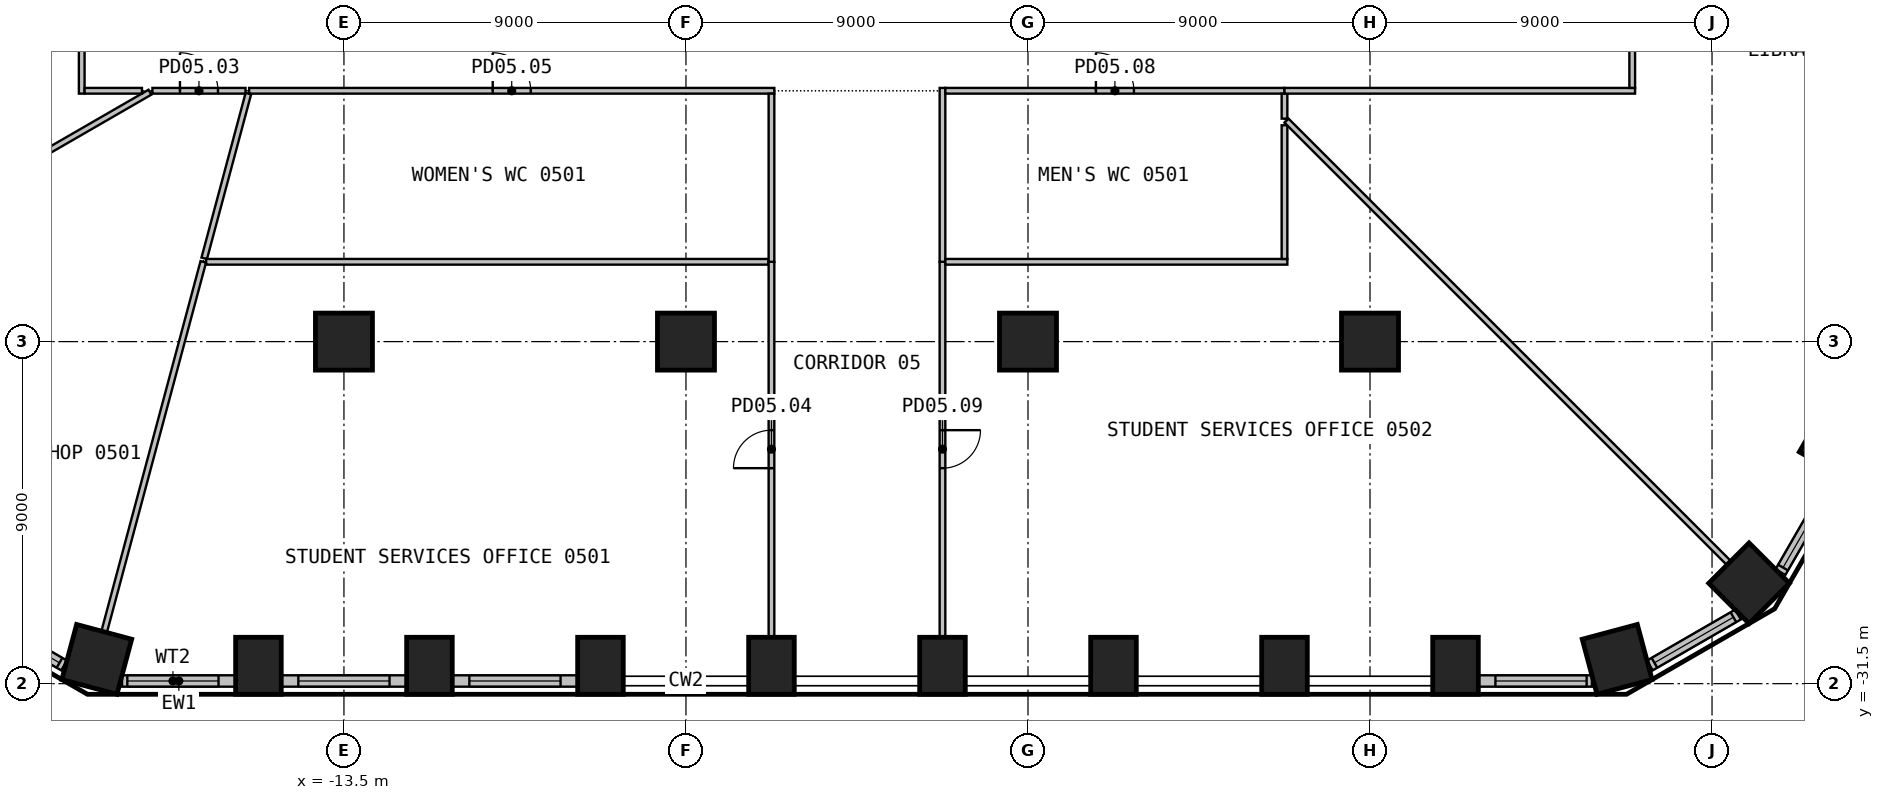
"""IFC4 building model, lengths in metres.
Left out: names, types, materials, properties, quantities, classifications, styles, units other than length and angle.
Written with IfcOpenShell. Run it as: python <this file> out.ifc"""

import sys

from ifc_helpers import new_model, si_unit, direction, frame, frame_2d, origin, origin_2d, place, context, subcontext, project, spatial, rectangle, circle, extrude, element, fill, save


model = new_model("IFC4")
c1 = context("Model", 3, precision=1e-05, world=origin(), true_north=direction((0.0, 1.0)))
c2 = subcontext(c1, "Body", "Model", "MODEL_VIEW")
j1 = project(units=[si_unit("LENGTHUNIT", "METRE"), si_unit("PLANEANGLEUNIT", "RADIAN")], contexts=[c1])
p1 = place(None, origin())
s1 = spatial("IfcSite", under=j1, at=p1, CompositionType="ELEMENT")
p2 = place(p1, origin())
s2 = spatial("IfcBuilding", under=s1, at=p2, CompositionType="ELEMENT")
p3 = place(p2, frame((0.0, 0.0, 25.2)))
s3 = spatial("IfcBuildingStorey", under=s2, at=p3, CompositionType="ELEMENT", Elevation=25.2)
p4 = place(p3, frame((-20.004, -30.861, 0.0), z_axis=(0.0, 0.0, 1.0), x_axis=(0.965925826289, -0.258819045103, 0.0)))
e1 = element("IfcColumn", 1, at=p4, inside=s3, PredefinedType="COLUMN", context=c2, shape_type="SweptSolid", body=[
    extrude(rectangle(XDim=1.5, YDim=1.5, at=origin_2d()), origin(), (0.0, 0.0, 1.0), 4.425),
])
for number, where, z_axis, x_axis in (
    (2, (-15.75, -31.03, 0.0), (0.0, 0.0, 1.0), (1.0, 0.0, 0.0)),
    (3, (-11.25, -31.03, 0.0), (0.0, 0.0, 1.0), (1.0, 0.0, 0.0)),
    (4, (-6.75, -31.03, 0.0), (0.0, 0.0, 1.0), (1.0, 0.0, 0.0)),
    (5, (-2.25, -31.03, 0.0), (0.0, 0.0, 1.0), (1.0, 0.0, 0.0)),
    (6, (2.25, -31.03, 0.0), (0.0, 0.0, 1.0), (1.0, 0.0, 0.0)),
    (7, (6.75, -31.03, 0.0), (0.0, 0.0, 1.0), (1.0, 0.0, 0.0)),
    (8, (11.25, -31.03, 0.0), (0.0, 0.0, 1.0), (1.0, 0.0, 0.0)),
    (9, (15.75, -31.03, 0.0), (0.0, 0.0, 1.0), (1.0, 0.0, 0.0)),
):
    element("IfcColumn", number, at=place(p3, frame(where, z_axis=z_axis, x_axis=x_axis)), inside=s3, PredefinedType="COLUMN", context=c2, shape_type="SweptSolid", body=[
        extrude(rectangle(XDim=1.2, YDim=1.5, at=origin_2d()), origin(), (0.0, 0.0, 1.0), 4.425),
    ])
for number, where, z_axis, x_axis in (
    (10, (20.004, -30.861, 0.0), (0.0, 0.0, 1.0), (0.966, 0.259, 0.0)),
    (11, (23.475, -28.857, 0.0), (0.0, 0.0, 1.0), (0.707, 0.707, 0.0)),
):
    element("IfcColumn", number, at=place(p3, frame(where, z_axis=z_axis, x_axis=x_axis)), inside=s3, PredefinedType="COLUMN", context=c2, shape_type="SweptSolid", body=[
        extrude(rectangle(XDim=1.5, YDim=1.5, at=origin_2d()), origin(), (0.0, 0.0, 1.0), 4.425),
    ])
p5 = place(p3, frame((25.748, -25.258, 0.0), z_axis=(0.0, 0.0, 1.0), x_axis=(0.5, 0.866025403784, 0.0)))
e12 = element("IfcColumn", 12, at=p5, inside=s3, PredefinedType="COLUMN", context=c2, shape_type="SweptSolid", body=[
    extrude(rectangle(XDim=1.2, YDim=1.5, at=origin_2d()), origin(), (0.0, 0.0, 1.0), 4.425),
])
for number, where, z_axis, x_axis in (
    (13, (-13.5, -22.5, 0.0), (0.0, 0.0, 1.0), (1.0, 0.0, 0.0)),
    (14, (-4.5, -22.5, 0.0), (0.0, 0.0, 1.0), (1.0, 0.0, 0.0)),
    (15, (4.5, -22.5, 0.0), (0.0, 0.0, 1.0), (1.0, 0.0, 0.0)),
    (16, (13.5, -22.5, 0.0), (0.0, 0.0, 1.0), (1.0, 0.0, 0.0)),
):
    element("IfcColumn", number, at=place(p3, frame(where, z_axis=z_axis, x_axis=x_axis)), inside=s3, PredefinedType="COLUMN", context=c2, shape_type="SweptSolid", body=[
        extrude(circle(Radius=0.75, at=origin_2d()), origin(), (0.0, 0.0, 1.0), 4.425),
    ])
p6 = place(p3, frame((-19.339, -31.43, 0.0), z_axis=(0.0, 0.0, 1.0), x_axis=(1.0, 0.0, 0.0)))
e17 = element("IfcWall", 17, at=p6, inside=s3, PredefinedType="SOLIDWALL", context=c2, shape_type="SweptSolid", body=[
    extrude(rectangle(XDim=2.989, YDim=0.3, at=frame_2d((1.494, 0.0))), origin(), (0.0, 0.0, 1.0), 4.425),
])
p7 = place(p6, frame((0.139, 0.0, 0.9)))
e18 = element("IfcOpeningElement", 18, at=p7, cuts=e17, PredefinedType="OPENING", context=c2, shape_type="SweptSolid", body=[
    extrude(rectangle(XDim=2.4, YDim=3.0, at=frame_2d((1.2, 1.5))), frame((0.0, 0.16, 0.0), z_axis=(0.0, -1.0, 0.0), x_axis=(1.0, 0.0, 0.0)), (0.0, 0.0, 1.0), 0.32),
])
p8 = place(p3, frame((-15.149, -31.43, 0.0), z_axis=(0.0, 0.0, 1.0), x_axis=(1.0, 0.0, 0.0)))
e19 = element("IfcWall", 19, at=p8, inside=s3, PredefinedType="SOLIDWALL", context=c2, shape_type="SweptSolid", body=[
    extrude(rectangle(XDim=3.299, YDim=0.3, at=frame_2d((1.649, 0.0))), origin(), (0.0, 0.0, 1.0), 4.425),
])
p9 = place(p8, frame((0.449, 0.0, 0.9)))
e20 = element("IfcOpeningElement", 20, at=p9, cuts=e19, PredefinedType="OPENING", context=c2, shape_type="SweptSolid", body=[
    extrude(rectangle(XDim=2.4, YDim=3.0, at=frame_2d((1.2, 1.5))), frame((0.0, 0.16, 0.0), z_axis=(0.0, -1.0, 0.0), x_axis=(1.0, 0.0, 0.0)), (0.0, 0.0, 1.0), 0.32),
])
p10 = place(p3, frame((-10.649, -31.43, 0.0), z_axis=(0.0, 0.0, 1.0), x_axis=(1.0, 0.0, 0.0)))
e21 = element("IfcWall", 21, at=p10, inside=s3, PredefinedType="SOLIDWALL", context=c2, shape_type="SweptSolid", body=[
    extrude(rectangle(XDim=3.299, YDim=0.3, at=frame_2d((1.649, 0.0))), origin(), (0.0, 0.0, 1.0), 4.425),
])
p11 = place(p10, frame((0.449, 0.0, 0.9)))
e22 = element("IfcOpeningElement", 22, at=p11, cuts=e21, PredefinedType="OPENING", context=c2, shape_type="SweptSolid", body=[
    extrude(rectangle(XDim=2.4, YDim=3.0, at=frame_2d((1.2, 1.5))), frame((0.0, 0.16, 0.0), z_axis=(0.0, -1.0, 0.0), x_axis=(1.0, 0.0, 0.0)), (0.0, 0.0, 1.0), 0.32),
])
p12 = place(p3, frame((16.351, -31.43, 0.0), z_axis=(0.0, 0.0, 1.0), x_axis=(1.0, 0.0, 0.0)))
e23 = element("IfcWall", 23, at=p12, inside=s3, PredefinedType="SOLIDWALL", context=c2, shape_type="SweptSolid", body=[
    extrude(rectangle(XDim=2.989, YDim=0.3, at=frame_2d((1.494, 0.0))), origin(), (0.0, 0.0, 1.0), 4.425),
])
p13 = place(p12, frame((0.449, 0.0, 0.9)))
e24 = element("IfcOpeningElement", 24, at=p13, cuts=e23, PredefinedType="OPENING", context=c2, shape_type="SweptSolid", body=[
    extrude(rectangle(XDim=2.4, YDim=3.0, at=frame_2d((1.2, 1.5))), frame((0.0, 0.16, 0.0), z_axis=(0.0, -1.0, 0.0), x_axis=(1.0, 0.0, 0.0)), (0.0, 0.0, 1.0), 0.32),
])
p14 = place(p3, frame((20.864, -31.021, 0.0), z_axis=(0.0, 0.0, 1.0), x_axis=(0.866001915448, 0.500040680786, 0.0)))
e25 = element("IfcWall", 25, at=p14, inside=s3, PredefinedType="SOLIDWALL", context=c2, shape_type="SweptSolid", body=[
    extrude(rectangle(XDim=2.678, YDim=0.3, at=frame_2d((1.339, 0.0))), origin(), (0.0, 0.0, 1.0), 4.425),
])
p15 = place(p14, frame((0.139, 0.0, 0.9)))
e26 = element("IfcOpeningElement", 26, at=p15, cuts=e25, PredefinedType="OPENING", context=c2, shape_type="SweptSolid", body=[
    extrude(rectangle(XDim=2.4, YDim=3.0, at=frame_2d((1.2, 1.5))), frame((0.0, 0.16, 0.0), z_axis=(0.0, -1.0, 0.0), x_axis=(1.0, 0.0, 0.0)), (0.0, 0.0, 1.0), 0.32),
])
p16 = place(p3, frame((24.299, -28.566, 0.0), z_axis=(0.0, 0.0, 1.0), x_axis=(0.49999586137, 0.866027793211, 0.0)))
e27 = element("IfcWall", 27, at=p16, inside=s3, PredefinedType="SOLIDWALL", context=c2, shape_type="SweptSolid", body=[
    extrude(rectangle(XDim=2.989, YDim=0.3, at=frame_2d((1.494, 0.0))), origin(), (0.0, 0.0, 1.0), 4.425),
])
p17 = place(p16, frame((0.139, 0.0, 0.9)))
e28 = element("IfcOpeningElement", 28, at=p17, cuts=e27, PredefinedType="OPENING", context=c2, shape_type="SweptSolid", body=[
    extrude(rectangle(XDim=2.4, YDim=3.0, at=frame_2d((1.2, 1.5))), frame((0.0, 0.16, 0.0), z_axis=(0.0, -1.0, 0.0), x_axis=(1.0, 0.0, 0.0)), (0.0, 0.0, 1.0), 0.32),
])
p18 = place(p3, frame((-23.183, -29.682, 0.0), z_axis=(0.0, 0.0, 1.0), x_axis=(0.866001915448, -0.500040680786, 0.0)))
e29 = element("IfcWall", 29, at=p18, inside=s3, PredefinedType="SOLIDWALL", context=c2, shape_type="SweptSolid", body=[
    extrude(rectangle(XDim=2.678, YDim=0.3, at=frame_2d((1.339, 0.0))), origin(), (0.0, 0.0, 1.0), 4.425),
])
p19 = place(p18, frame((0.139, 0.0, 0.9)))
e30 = element("IfcOpeningElement", 30, at=p19, cuts=e29, PredefinedType="OPENING", context=c2, shape_type="SweptSolid", body=[
    extrude(rectangle(XDim=2.4, YDim=3.0, at=frame_2d((1.2, 1.5))), frame((0.0, 0.16, 0.0), z_axis=(0.0, -1.0, 0.0), x_axis=(1.0, 0.0, 0.0)), (0.0, 0.0, 1.0), 0.32),
])
p20 = place(p3, frame((-18.605, -15.938, 0.0), z_axis=(0.0, 0.0, 1.0), x_axis=(-0.865988664976, -0.500063628085, 0.0)))
e31 = element("IfcWall", 31, at=p20, inside=s3, PredefinedType="PARTITIONING", context=c2, shape_type="SweptSolid", body=[
    extrude(rectangle(XDim=10.076, YDim=0.15, at=frame_2d((5.038, 0.0))), origin(), (0.0, 0.0, 1.0), 4.425),
])
p21 = place(p3, frame((-20.4, 2.974, 0.0), z_axis=(0.0, 0.0, 1.0), x_axis=(0.0, -1.0, 0.0)))
e32 = element("IfcWall", 32, at=p21, inside=s3, PredefinedType="PARTITIONING", context=c2, shape_type="SweptSolid", body=[
    extrude(rectangle(XDim=18.949, YDim=0.15, at=frame_2d((9.475, 0.0))), origin(), (0.0, 0.0, 1.0), 4.425),
])
p22 = place(p21, frame((8.975, 0.0, 0.0)))
e33 = element("IfcOpeningElement", 33, at=p22, cuts=e32, PredefinedType="OPENING", context=c2, shape_type="SweptSolid", body=[
    extrude(rectangle(XDim=1.0, YDim=2.1, at=frame_2d((0.5, 1.05))), frame((0.0, 0.085, 0.0), z_axis=(0.0, -1.0, 0.0), x_axis=(1.0, 0.0, 0.0)), (0.0, 0.0, 1.0), 0.17),
])
p23 = place(p3, frame((-20.325, -15.9, 0.0), z_axis=(0.0, 0.0, 1.0), x_axis=(1.0, 0.0, 0.0)))
e34 = element("IfcWall", 34, at=p23, inside=s3, PredefinedType="PARTITIONING", context=c2, shape_type="SweptSolid", body=[
    extrude(rectangle(XDim=1.51, YDim=0.15, at=frame_2d((0.755, 0.0))), origin(), (0.0, 0.0, 1.0), 4.425),
])
p24 = place(p3, frame((-17.201, -20.4, 0.0), z_axis=(0.0, 0.0, 1.0), x_axis=(-0.258837572796, -0.965920861618, 0.0)))
e35 = element("IfcWall", 35, at=p24, inside=s3, PredefinedType="PARTITIONING", context=c2, shape_type="SweptSolid", body=[
    extrude(rectangle(XDim=10.06, YDim=0.15, at=frame_2d((5.03, 0.0))), origin(), (0.0, 0.0, 1.0), 4.425),
])
p25 = place(p3, frame((-18.54, -15.9, 0.0), z_axis=(0.0, 0.0, 1.0), x_axis=(1.0, 0.0, 0.0)))
e36 = element("IfcWall", 36, at=p25, inside=s3, PredefinedType="PARTITIONING", context=c2, shape_type="SweptSolid", body=[
    extrude(rectangle(XDim=2.45, YDim=0.15, at=frame_2d((1.225, 0.0))), origin(), (0.0, 0.0, 1.0), 4.425),
])
p26 = place(p25, frame((0.725, 0.0, 0.0)))
e37 = element("IfcOpeningElement", 37, at=p26, cuts=e36, PredefinedType="OPENING", context=c2, shape_type="SweptSolid", body=[
    extrude(rectangle(XDim=1.0, YDim=2.1, at=frame_2d((0.5, 1.05))), frame((0.0, 0.085, 0.0), z_axis=(0.0, -1.0, 0.0), x_axis=(1.0, 0.0, 0.0)), (0.0, 0.0, 1.0), 0.17),
])
p27 = place(p3, frame((-16.014, -15.972, 0.0), z_axis=(0.0, 0.0, 1.0), x_axis=(-0.258894670978, -0.965905559224, 0.0)))
e38 = element("IfcWall", 38, at=p27, inside=s3, PredefinedType="PARTITIONING", context=c2, shape_type="SweptSolid", body=[
    extrude(rectangle(XDim=4.489, YDim=0.15, at=frame_2d((2.244, 0.0))), origin(), (0.0, 0.0, 1.0), 4.425),
])
p28 = place(p3, frame((-17.126, -20.4, 0.0), z_axis=(0.0, 0.0, 1.0), x_axis=(1.0, 0.0, 0.0)))
e39 = element("IfcWall", 39, at=p28, inside=s3, PredefinedType="PARTITIONING", context=c2, shape_type="SweptSolid", body=[
    extrude(rectangle(XDim=14.801, YDim=0.15, at=frame_2d((7.4, 0.0))), origin(), (0.0, 0.0, 1.0), 4.425),
])
p29 = place(p3, frame((-15.995, -15.9, 0.0), z_axis=(0.0, 0.0, 1.0), x_axis=(1.0, 0.0, 0.0)))
e40 = element("IfcWall", 40, at=p29, inside=s3, PredefinedType="PARTITIONING", context=c2, shape_type="SweptSolid", body=[
    extrude(rectangle(XDim=13.82, YDim=0.15, at=frame_2d((6.91, 0.0))), origin(), (0.0, 0.0, 1.0), 4.425),
])
p30 = place(p29, frame((6.41, 0.0, 0.0)))
e41 = element("IfcOpeningElement", 41, at=p30, cuts=e40, PredefinedType="OPENING", context=c2, shape_type="SweptSolid", body=[
    extrude(rectangle(XDim=1.0, YDim=2.1, at=frame_2d((0.5, 1.05))), frame((0.0, 0.085, 0.0), z_axis=(0.0, -1.0, 0.0), x_axis=(1.0, 0.0, 0.0)), (0.0, 0.0, 1.0), 0.17),
])
p31 = place(p3, frame((-2.25, -30.26, 0.0), z_axis=(0.0, 0.0, 1.0), x_axis=(0.0, 1.0, 0.0)))
e42 = element("IfcWall", 42, at=p31, inside=s3, PredefinedType="PARTITIONING", context=c2, shape_type="SweptSolid", body=[
    extrude(rectangle(XDim=9.86, YDim=0.15, at=frame_2d((4.93, 0.0))), origin(), (0.0, 0.0, 1.0), 4.425),
])
p32 = place(p31, frame((4.43, 0.0, 0.0)))
e43 = element("IfcOpeningElement", 43, at=p32, cuts=e42, PredefinedType="OPENING", context=c2, shape_type="SweptSolid", body=[
    extrude(rectangle(XDim=1.0, YDim=2.1, at=frame_2d((0.5, 1.05))), frame((0.0, 0.085, 0.0), z_axis=(0.0, -1.0, 0.0), x_axis=(1.0, 0.0, 0.0)), (0.0, 0.0, 1.0), 0.17),
])
p33 = place(p3, frame((-2.25, -20.4, 0.0), z_axis=(0.0, 0.0, 1.0), x_axis=(0.0, 1.0, 0.0)))
e44 = element("IfcWall", 44, at=p33, inside=s3, PredefinedType="PARTITIONING", context=c2, shape_type="SweptSolid", body=[
    extrude(rectangle(XDim=4.425, YDim=0.15, at=frame_2d((2.212, 0.0))), origin(), (0.0, 0.0, 1.0), 4.425),
])
p34 = place(p3, frame((2.25, -20.4, 0.0), z_axis=(0.0, 0.0, 1.0), x_axis=(0.0, -1.0, 0.0)))
e45 = element("IfcWall", 45, at=p34, inside=s3, PredefinedType="PARTITIONING", context=c2, shape_type="SweptSolid", body=[
    extrude(rectangle(XDim=9.86, YDim=0.15, at=frame_2d((4.93, 0.0))), origin(), (0.0, 0.0, 1.0), 4.425),
])
p35 = place(p34, frame((4.43, 0.0, 0.0)))
e46 = element("IfcOpeningElement", 46, at=p35, cuts=e45, PredefinedType="OPENING", context=c2, shape_type="SweptSolid", body=[
    extrude(rectangle(XDim=1.0, YDim=2.1, at=frame_2d((0.5, 1.05))), frame((0.0, 0.085, 0.0), z_axis=(0.0, -1.0, 0.0), x_axis=(1.0, 0.0, 0.0)), (0.0, 0.0, 1.0), 0.17),
])
p36 = place(p3, frame((2.25, -15.825, 0.0), z_axis=(0.0, 0.0, 1.0), x_axis=(0.0, -1.0, 0.0)))
e47 = element("IfcWall", 47, at=p36, inside=s3, PredefinedType="PARTITIONING", context=c2, shape_type="SweptSolid", body=[
    extrude(rectangle(XDim=4.575, YDim=0.15, at=frame_2d((2.288, 0.0))), origin(), (0.0, 0.0, 1.0), 4.425),
])
p37 = place(p3, frame((11.325, -20.4, 0.0), z_axis=(0.0, 0.0, 1.0), x_axis=(-1.0, 0.0, 0.0)))
e48 = element("IfcWall", 48, at=p37, inside=s3, PredefinedType="PARTITIONING", context=c2, shape_type="SweptSolid", body=[
    extrude(rectangle(XDim=9.0, YDim=0.15, at=frame_2d((4.5, 0.0))), origin(), (0.0, 0.0, 1.0), 4.425),
])
p38 = place(p3, frame((2.325, -15.9, 0.0), z_axis=(0.0, 0.0, 1.0), x_axis=(1.0, 0.0, 0.0)))
e49 = element("IfcWall", 49, at=p38, inside=s3, PredefinedType="PARTITIONING", context=c2, shape_type="SweptSolid", body=[
    extrude(rectangle(XDim=8.925, YDim=0.15, at=frame_2d((4.462, 0.0))), origin(), (0.0, 0.0, 1.0), 4.425),
])
p39 = place(p38, frame((3.962, 0.0, 0.0)))
e50 = element("IfcOpeningElement", 50, at=p39, cuts=e49, PredefinedType="OPENING", context=c2, shape_type="SweptSolid", body=[
    extrude(rectangle(XDim=1.0, YDim=2.1, at=frame_2d((0.5, 1.05))), frame((0.0, 0.085, 0.0), z_axis=(0.0, -1.0, 0.0), x_axis=(1.0, 0.0, 0.0)), (0.0, 0.0, 1.0), 0.17),
])
p40 = place(p3, frame((11.25, -16.808, 0.0), z_axis=(0.0, 0.0, 1.0), x_axis=(0.0, -1.0, 0.0)))
e51 = element("IfcWall", 51, at=p40, inside=s3, PredefinedType="PARTITIONING", context=c2, shape_type="SweptSolid", body=[
    extrude(rectangle(XDim=3.517, YDim=0.15, at=frame_2d((1.758, 0.0))), origin(), (0.0, 0.0, 1.0), 4.425),
])
p41 = place(p3, frame((11.25, -15.975, 0.0), z_axis=(0.0, 0.0, 1.0), x_axis=(0.0, -1.0, 0.0)))
e52 = element("IfcWall", 52, at=p41, inside=s3, PredefinedType="PARTITIONING", context=c2, shape_type="SweptSolid", body=[
    extrude(rectangle(XDim=0.658, YDim=0.15, at=frame_2d((0.329, 0.0))), origin(), (0.0, 0.0, 1.0), 4.425),
])
p42 = place(p3, frame((11.303, -16.686, 0.0), z_axis=(0.0, 0.0, 1.0), x_axis=(0.707114204919, -0.707099357376, 0.0)))
e53 = element("IfcWall", 53, at=p42, inside=s3, PredefinedType="PARTITIONING", context=c2, shape_type="SweptSolid", body=[
    extrude(rectangle(XDim=16.443, YDim=0.15, at=frame_2d((8.222, 0.0))), origin(), (0.0, 0.0, 1.0), 4.425),
])
p43 = place(p3, frame((11.25, -15.9, 0.0), z_axis=(0.0, 0.0, 1.0), x_axis=(1.0, 0.0, 0.0)))
e54 = element("IfcWall", 54, at=p43, inside=s3, PredefinedType="PARTITIONING", context=c2, shape_type="SweptSolid", body=[
    extrude(rectangle(XDim=9.225, YDim=0.15, at=frame_2d((4.613, 0.0))), origin(), (0.0, 0.0, 1.0), 4.425),
])
p44 = place(p3, frame((20.4, -15.825, 0.0), z_axis=(0.0, 0.0, 1.0), x_axis=(0.0, 1.0, 0.0)))
e55 = element("IfcWall", 55, at=p44, inside=s3, PredefinedType="PARTITIONING", context=c2, shape_type="SweptSolid", body=[
    extrude(rectangle(XDim=13.65, YDim=0.15, at=frame_2d((6.825, 0.0))), origin(), (0.0, 0.0, 1.0), 4.425),
])
p45 = place(p7, origin())
e56 = element("IfcWindow", 56, at=p45, inside=s3, PartitioningType="SINGLE_PANEL", PredefinedType="WINDOW", context=c2, shape_type="SweptSolid", body=[
    extrude(rectangle(XDim=2.4, YDim=3.0, at=frame_2d((1.2, 1.5))), frame((0.0, 0.03, 0.0), z_axis=(0.0, -1.0, 0.0), x_axis=(1.0, 0.0, 0.0)), (0.0, 0.0, 1.0), 0.06),
])
fill(e18, e56)
p46 = place(p9, origin())
e57 = element("IfcWindow", 57, at=p46, inside=s3, PartitioningType="SINGLE_PANEL", PredefinedType="WINDOW", context=c2, shape_type="SweptSolid", body=[
    extrude(rectangle(XDim=2.4, YDim=3.0, at=frame_2d((1.2, 1.5))), frame((0.0, 0.03, 0.0), z_axis=(0.0, -1.0, 0.0), x_axis=(1.0, 0.0, 0.0)), (0.0, 0.0, 1.0), 0.06),
])
fill(e20, e57)
p47 = place(p11, origin())
e58 = element("IfcWindow", 58, at=p47, inside=s3, PartitioningType="SINGLE_PANEL", PredefinedType="WINDOW", context=c2, shape_type="SweptSolid", body=[
    extrude(rectangle(XDim=2.4, YDim=3.0, at=frame_2d((1.2, 1.5))), frame((0.0, 0.03, 0.0), z_axis=(0.0, -1.0, 0.0), x_axis=(1.0, 0.0, 0.0)), (0.0, 0.0, 1.0), 0.06),
])
fill(e22, e58)
p48 = place(p13, origin())
e59 = element("IfcWindow", 59, at=p48, inside=s3, PartitioningType="SINGLE_PANEL", PredefinedType="WINDOW", context=c2, shape_type="SweptSolid", body=[
    extrude(rectangle(XDim=2.4, YDim=3.0, at=frame_2d((1.2, 1.5))), frame((0.0, 0.03, 0.0), z_axis=(0.0, -1.0, 0.0), x_axis=(1.0, 0.0, 0.0)), (0.0, 0.0, 1.0), 0.06),
])
fill(e24, e59)
p49 = place(p15, origin())
e60 = element("IfcWindow", 60, at=p49, inside=s3, PartitioningType="SINGLE_PANEL", PredefinedType="WINDOW", context=c2, shape_type="SweptSolid", body=[
    extrude(rectangle(XDim=2.4, YDim=3.0, at=frame_2d((1.2, 1.5))), frame((0.0, 0.03, 0.0), z_axis=(0.0, -1.0, 0.0), x_axis=(1.0, 0.0, 0.0)), (0.0, 0.0, 1.0), 0.06),
])
fill(e26, e60)
p50 = place(p17, origin())
e61 = element("IfcWindow", 61, at=p50, inside=s3, PartitioningType="SINGLE_PANEL", PredefinedType="WINDOW", context=c2, shape_type="SweptSolid", body=[
    extrude(rectangle(XDim=2.4, YDim=3.0, at=frame_2d((1.2, 1.5))), frame((0.0, 0.03, 0.0), z_axis=(0.0, -1.0, 0.0), x_axis=(1.0, 0.0, 0.0)), (0.0, 0.0, 1.0), 0.06),
])
fill(e28, e61)
p51 = place(p19, origin())
e62 = element("IfcWindow", 62, at=p51, inside=s3, PartitioningType="SINGLE_PANEL", PredefinedType="WINDOW", context=c2, shape_type="SweptSolid", body=[
    extrude(rectangle(XDim=2.4, YDim=3.0, at=frame_2d((1.2, 1.5))), frame((0.0, 0.03, 0.0), z_axis=(0.0, -1.0, 0.0), x_axis=(1.0, 0.0, 0.0)), (0.0, 0.0, 1.0), 0.06),
])
fill(e30, e62)
p52 = place(p26, origin())
e63 = element("IfcDoor", 63, at=p52, inside=s3, OperationType="SINGLE_SWING_LEFT", PredefinedType="DOOR", context=c2, shape_type="SweptSolid", body=[
    extrude(rectangle(XDim=1.0, YDim=2.1, at=frame_2d((0.5, 1.05))), frame((0.0, 0.025, 0.0), z_axis=(0.0, -1.0, 0.0), x_axis=(1.0, 0.0, 0.0)), (0.0, 0.0, 1.0), 0.05),
])
fill(e37, e63)
p53 = place(p32, origin())
e64 = element("IfcDoor", 64, at=p53, inside=s3, OperationType="SINGLE_SWING_RIGHT", PredefinedType="DOOR", context=c2, shape_type="SweptSolid", body=[
    extrude(rectangle(XDim=1.0, YDim=2.1, at=frame_2d((0.5, 1.05))), frame((0.0, 0.025, 0.0), z_axis=(0.0, -1.0, 0.0), x_axis=(1.0, 0.0, 0.0)), (0.0, 0.0, 1.0), 0.05),
])
fill(e43, e64)
p54 = place(p30, origin())
e65 = element("IfcDoor", 65, at=p54, inside=s3, OperationType="SINGLE_SWING_RIGHT", PredefinedType="DOOR", context=c2, shape_type="SweptSolid", body=[
    extrude(rectangle(XDim=1.0, YDim=2.1, at=frame_2d((0.5, 1.05))), frame((0.0, 0.025, 0.0), z_axis=(0.0, -1.0, 0.0), x_axis=(1.0, 0.0, 0.0)), (0.0, 0.0, 1.0), 0.05),
])
fill(e41, e65)
p55 = place(p39, origin())
e66 = element("IfcDoor", 66, at=p55, inside=s3, OperationType="SINGLE_SWING_LEFT", PredefinedType="DOOR", context=c2, shape_type="SweptSolid", body=[
    extrude(rectangle(XDim=1.0, YDim=2.1, at=frame_2d((0.5, 1.05))), frame((0.0, 0.025, 0.0), z_axis=(0.0, -1.0, 0.0), x_axis=(1.0, 0.0, 0.0)), (0.0, 0.0, 1.0), 0.05),
])
fill(e50, e66)
p56 = place(p35, origin())
e67 = element("IfcDoor", 67, at=p56, inside=s3, OperationType="SINGLE_SWING_RIGHT", PredefinedType="DOOR", context=c2, shape_type="SweptSolid", body=[
    extrude(rectangle(XDim=1.0, YDim=2.1, at=frame_2d((0.5, 1.05))), frame((0.0, 0.025, 0.0), z_axis=(0.0, -1.0, 0.0), x_axis=(1.0, 0.0, 0.0)), (0.0, 0.0, 1.0), 0.05),
])
fill(e46, e67)
save(model, sys.argv[1])
